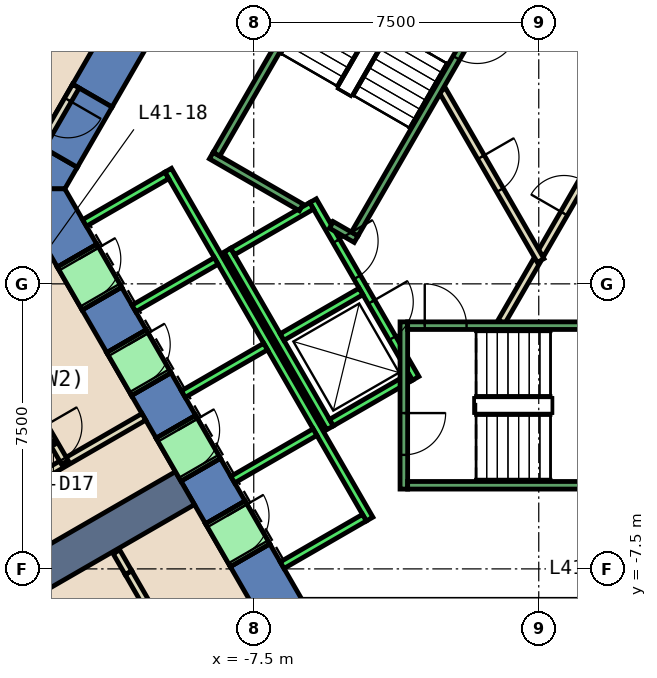
"""IFC4 building model, lengths in metres.
Left out: names, types, materials, properties, quantities, classifications, styles, units other than length and angle.
Written with IfcOpenShell. Run it as: python <this file> out.ifc"""

import sys

from ifc_helpers import new_model, si_unit, direction, frame, frame_2d, origin, place, context, subcontext, project, spatial, polyline, rectangle, outline, extrude, element, fill, save


model = new_model("IFC4")
c1 = context("Model", 3, precision=1e-05, world=origin(), true_north=direction((0.0, 1.0)))
c2 = subcontext(c1, "Body", "Model", "MODEL_VIEW")
j1 = project(units=[si_unit("LENGTHUNIT", "METRE"), si_unit("PLANEANGLEUNIT", "RADIAN")], contexts=[c1])
p1 = place(None, origin())
s1 = spatial("IfcSite", under=j1, at=p1, CompositionType="ELEMENT")
p2 = place(p1, origin())
s2 = spatial("IfcBuilding", under=s1, at=p2, CompositionType="ELEMENT")
p3 = place(p2, frame((0.0, 0.0, 184.4)))
s3 = spatial("IfcBuildingStorey", under=s2, at=p3, CompositionType="ELEMENT", Elevation=184.4)
p4 = place(p3, frame((0.0, 0.0, -0.6)))
e1 = element("IfcWall", 1, at=p4, inside=s3, PredefinedType="SHEAR", context=c2, shape_type="SweptSolid", body=[
    extrude(outline(polyline([(-12.267, 5.252), (-11.228, 4.652), (-6.235, 13.3), (-6.928, 14.5), (-12.267, 5.252)])), origin(), (0.0, 0.0, 1.0), 5.4),
])
p5 = place(p3, frame((0.0, 0.0, -0.6)))
e2 = element("IfcWall", 2, at=p5, inside=s3, PredefinedType="SHEAR", context=c2, shape_type="SweptSolid", body=[
    extrude(outline(polyline([(-12.143, 3.068), (-13.182, 3.667), (-13.856, 2.5), (-12.471, 2.5), (-12.143, 3.068)])), origin(), (0.0, 0.0, 1.0), 5.4),
])
p6 = place(p3, frame((0.0, 0.0, 3.6)))
e3 = element("IfcWall", 3, at=p6, inside=s3, PredefinedType="SHEAR", context=c2, shape_type="SweptSolid", body=[
    extrude(outline(polyline([(-13.182, 3.667), (-12.143, 3.068), (-11.228, 4.652), (-12.267, 5.252), (-13.182, 3.667)])), origin(), (0.0, 0.0, 1.0), 1.2),
])
p7 = place(p3, frame((0.0, 0.0, -0.6)))
e4 = element("IfcWall", 4, at=p7, inside=s3, PredefinedType="SHEAR", context=c2, shape_type="SweptSolid", body=[
    extrude(outline(polyline([(-12.667, 0.44), (-11.628, 1.04), (-12.471, 2.5), (-13.856, 2.5), (-12.667, 0.44)])), origin(), (0.0, 0.0, 1.0), 5.4),
])
p8 = place(p3, frame((0.0, 0.0, -0.6)))
e5 = element("IfcWall", 5, at=p8, inside=s3, PredefinedType="SHEAR", context=c2, shape_type="SweptSolid", body=[
    extrude(outline(polyline([(-11.367, -1.811), (-10.328, -1.211), (-10.978, -0.086), (-12.017, -0.686), (-11.367, -1.811)])), origin(), (0.0, 0.0, 1.0), 5.4),
])
p9 = place(p3, frame((0.0, 0.0, -0.6)))
e6 = element("IfcWall", 6, at=p9, inside=s3, PredefinedType="SHEAR", context=c2, shape_type="SweptSolid", body=[
    extrude(outline(polyline([(-10.067, -4.063), (-9.028, -3.463), (-9.678, -2.337), (-10.717, -2.937), (-10.067, -4.063)])), origin(), (0.0, 0.0, 1.0), 5.4),
])
p10 = place(p3, frame((0.0, 0.0, -0.6)))
e7 = element("IfcWall", 7, at=p10, inside=s3, PredefinedType="SHEAR", context=c2, shape_type="SweptSolid", body=[
    extrude(outline(polyline([(-8.767, -6.314), (-7.728, -5.714), (-8.378, -4.589), (-9.417, -5.189), (-8.767, -6.314)])), origin(), (0.0, 0.0, 1.0), 5.4),
])
p11 = place(p3, frame((0.0, 0.0, -0.6)))
e8 = element("IfcWall", 8, at=p11, inside=s3, PredefinedType="SHEAR", context=c2, shape_type="SweptSolid", body=[
    extrude(outline(polyline([(-7.078, -6.84), (-8.117, -7.44), (-6.928, -9.5), (-6.235, -8.3), (-7.078, -6.84)])), origin(), (0.0, 0.0, 1.0), 5.4),
])
p12 = place(p3, frame((0.0, 0.0, 3.6)))
e9 = element("IfcWall", 9, at=p12, inside=s3, PredefinedType="SHEAR", context=c2, shape_type="SweptSolid", body=[
    extrude(outline(polyline([(-12.017, -0.686), (-10.978, -0.086), (-11.628, 1.04), (-12.667, 0.44), (-12.017, -0.686)])), origin(), (0.0, 0.0, 1.0), 1.2),
])
p13 = place(p3, frame((0.0, 0.0, 3.6)))
e10 = element("IfcWall", 10, at=p13, inside=s3, PredefinedType="SHEAR", context=c2, shape_type="SweptSolid", body=[
    extrude(outline(polyline([(-10.717, -2.937), (-9.678, -2.337), (-10.328, -1.211), (-11.367, -1.811), (-10.717, -2.937)])), origin(), (0.0, 0.0, 1.0), 1.2),
])
p14 = place(p3, frame((0.0, 0.0, 3.6)))
e11 = element("IfcWall", 11, at=p14, inside=s3, PredefinedType="SHEAR", context=c2, shape_type="SweptSolid", body=[
    extrude(outline(polyline([(-9.417, -5.189), (-8.378, -4.589), (-9.028, -3.463), (-10.067, -4.063), (-9.417, -5.189)])), origin(), (0.0, 0.0, 1.0), 1.2),
])
p15 = place(p3, frame((0.0, 0.0, 3.6)))
e12 = element("IfcWall", 12, at=p15, inside=s3, PredefinedType="SHEAR", context=c2, shape_type="SweptSolid", body=[
    extrude(outline(polyline([(-8.117, -7.44), (-7.078, -6.84), (-7.728, -5.714), (-8.767, -6.314), (-8.117, -7.44)])), origin(), (0.0, 0.0, 1.0), 1.2),
])
p16 = place(p3, frame((-9.31, -5.375, 0.0), z_axis=(0.0, 0.0, 1.0), x_axis=(-0.866015103238, -0.500017840646, 0.0)))
e13 = element("IfcWall", 13, at=p16, inside=s3, PredefinedType="SHEAR", context=c2, shape_type="SweptSolid", body=[
    extrude(rectangle(XDim=27.139, YDim=1.0, at=frame_2d((13.57, 0.0))), origin(), (0.0, 0.0, 1.0), 4.8),
])
p17 = place(p3, frame((-0.982, -1.0, 0.0), z_axis=(0.0, 0.0, 1.0), x_axis=(0.50024047865, 0.865886518847, 0.0)))
e14 = element("IfcWall", 14, at=p17, inside=s3, PredefinedType="PARTITIONING", context=c2, shape_type="SweptSolid", body=[
    extrude(rectangle(XDim=1.863, YDim=0.2, at=frame_2d((0.931, 0.0))), origin(), (0.0, 0.0, 1.0), 4.8),
])
p18 = place(p3, frame((0.05, 0.787, 0.0), z_axis=(0.0, 0.0, 1.0), x_axis=(0.499954076797, 0.866051915934, 0.0)))
e15 = element("IfcWall", 15, at=p18, inside=s3, PredefinedType="PARTITIONING", context=c2, shape_type="SweptSolid", body=[
    extrude(rectangle(XDim=3.558, YDim=0.2, at=frame_2d((1.779, 0.0))), origin(), (0.0, 0.0, 1.0), 4.8),
])
p19 = place(p18, frame((1.229, 0.0, 0.0)))
e16 = element("IfcOpeningElement", 16, at=p19, cuts=e15, PredefinedType="OPENING", context=c2, shape_type="SweptSolid", body=[
    extrude(rectangle(XDim=1.0, YDim=2.1, at=frame_2d((0.5, 1.05))), frame((0.0, 0.11, 0.0), z_axis=(0.0, -1.0, 0.0), x_axis=(1.0, 0.0, 0.0)), (0.0, 0.0, 1.0), 0.22),
])
p20 = place(p3, frame((-2.54, 5.1, 0.0), z_axis=(0.0, 0.0, 1.0), x_axis=(0.499925051871, -0.866068670783, 0.0)))
e17 = element("IfcWall", 17, at=p20, inside=s3, PredefinedType="PARTITIONING", context=c2, shape_type="SweptSolid", body=[
    extrude(rectangle(XDim=5.181, YDim=0.2, at=frame_2d((2.59, 0.0))), origin(), (0.0, 0.0, 1.0), 4.8),
])
p21 = place(p20, frame((2.04, 0.0, 0.0)))
e18 = element("IfcOpeningElement", 18, at=p21, cuts=e17, PredefinedType="OPENING", context=c2, shape_type="SweptSolid", body=[
    extrude(rectangle(XDim=1.0, YDim=2.1, at=frame_2d((0.5, 1.05))), frame((0.0, 0.11, 0.0), z_axis=(0.0, -1.0, 0.0), x_axis=(1.0, 0.0, 0.0)), (0.0, 0.0, 1.0), 0.22),
])
p22 = place(p3, frame((-35.502, -17.996, 0.0), z_axis=(0.0, 0.0, 1.0), x_axis=(0.866041720547, 0.499971737474, 0.0)))
e19 = element("IfcWall", 19, at=p22, inside=s3, PredefinedType="PARTITIONING", context=c2, shape_type="SweptSolid", body=[
    extrude(rectangle(XDim=28.994, YDim=0.2, at=frame_2d((14.497, 0.0))), origin(), (0.0, 0.0, 1.0), 4.8),
])
p23 = place(p3, frame((-14.001, -2.05, 0.0), z_axis=(0.0, 0.0, 1.0), x_axis=(0.500026340207, -0.866010195725, 0.0)))
e20 = element("IfcWall", 20, at=p23, inside=s3, PredefinedType="PARTITIONING", context=c2, shape_type="SweptSolid", body=[
    extrude(rectangle(XDim=3.06, YDim=0.2, at=frame_2d((1.53, 0.0))), origin(), (0.0, 0.0, 1.0), 4.8),
])
p24 = place(p23, frame((1.96, 0.0, 0.0)))
e21 = element("IfcOpeningElement", 21, at=p24, cuts=e20, PredefinedType="OPENING", context=c2, shape_type="SweptSolid", body=[
    extrude(rectangle(XDim=1.0, YDim=2.1, at=frame_2d((0.5, 1.05))), frame((0.0, 0.11, 0.0), z_axis=(0.0, -1.0, 0.0), x_axis=(1.0, 0.0, 0.0)), (0.0, 0.0, 1.0), 0.22),
])
p25 = place(p3, frame((-12.181, 5.202, 0.0), z_axis=(0.0, 0.0, 1.0), x_axis=(-0.500215337403, -0.865901042976, 0.0)))
e22 = element("IfcWall", 22, at=p25, inside=s3, PredefinedType="PARTITIONING", context=c2, shape_type="SweptSolid", body=[
    extrude(rectangle(XDim=1.829, YDim=0.2, at=frame_2d((0.915, 0.0))), origin(), (0.0, 0.0, 1.0), 2.4),
])
p26 = place(p25, frame((0.415, 0.0, 0.0)))
e23 = element("IfcOpeningElement", 23, at=p26, cuts=e22, PredefinedType="OPENING", context=c2, shape_type="SweptSolid", body=[
    extrude(rectangle(XDim=1.0, YDim=2.1, at=frame_2d((0.5, 1.05))), frame((0.0, 0.11, 0.0), z_axis=(0.0, -1.0, 0.0), x_axis=(1.0, 0.0, 0.0)), (0.0, 0.0, 1.0), 0.22),
])
p27 = place(p3, frame((-10.328, -8.412, 0.0), z_axis=(0.0, 0.0, 1.0), x_axis=(-0.4998875608, 0.866090310855, 0.0)))
e24 = element("IfcWall", 24, at=p27, inside=s3, PredefinedType="PARTITIONING", context=c2, shape_type="SweptSolid", body=[
    extrude(rectangle(XDim=0.939, YDim=0.2, at=frame_2d((0.469, 0.0))), origin(), (0.0, 0.0, 1.0), 4.8),
])
p28 = place(p3, frame((-10.797, -7.599, 0.0), z_axis=(0.0, 0.0, 1.0), x_axis=(-0.499377186864, 0.866384686638, 0.0)))
e25 = element("IfcWall", 25, at=p28, inside=s3, PredefinedType="PARTITIONING", context=c2, shape_type="SweptSolid", body=[
    extrude(rectangle(XDim=0.633, YDim=0.2, at=frame_2d((0.316, 0.0))), origin(), (0.0, 0.0, 1.0), 2.4),
])
p29 = place(p3, frame((-5.94, 2.188, 0.0), z_axis=(0.0, 0.0, 1.0), x_axis=(0.500034260056, -0.866005622828, 0.0)))
e26 = element("IfcWall", 26, at=p29, inside=s3, PredefinedType="STANDARD", context=c2, shape_type="SweptSolid", body=[
    extrude(rectangle(XDim=5.399, YDim=0.2, at=frame_2d((2.7, 0.0))), origin(), (0.0, 0.0, 1.0), 4.8),
])
p30 = place(p29, frame((3.075, 0.0, 0.0)))
e27 = element("IfcOpeningElement", 27, at=p30, cuts=e26, PredefinedType="OPENING", context=c2, shape_type="SweptSolid", body=[
    extrude(rectangle(XDim=1.1, YDim=2.1, at=frame_2d((0.55, 1.05))), frame((0.0, 0.11, 0.0), z_axis=(0.0, -1.0, 0.0), x_axis=(1.0, 0.0, 0.0)), (0.0, 0.0, 1.0), 0.22),
])
p31 = place(p29, frame((1.225, 0.0, 0.0)))
e28 = element("IfcOpeningElement", 28, at=p31, cuts=e26, PredefinedType="OPENING", context=c2, shape_type="SweptSolid", body=[
    extrude(rectangle(XDim=1.1, YDim=2.1, at=frame_2d((0.55, 1.05))), frame((0.0, 0.11, 0.0), z_axis=(0.0, -1.0, 0.0), x_axis=(1.0, 0.0, 0.0)), (0.0, 0.0, 1.0), 0.22),
])
p32 = place(p3, frame((-8.192, 0.888, 0.0), z_axis=(0.0, 0.0, 1.0), x_axis=(0.500034260056, -0.866005622828, 0.0)))
e29 = element("IfcWall", 29, at=p32, inside=s3, PredefinedType="STANDARD", context=c2, shape_type="SweptSolid", body=[
    extrude(rectangle(XDim=5.399, YDim=0.2, at=frame_2d((2.7, 0.0))), origin(), (0.0, 0.0, 1.0), 4.8),
])
for number, where, z_axis, x_axis in (
    (30, (-5.977, 2.052, 0.0), (0.0, 0.0, 1.0), (-0.866, -0.5, 0.0)),
    (31, (-4.677, -0.2, 0.0), (0.0, 0.0, 1.0), (-0.866, -0.5, 0.0)),
):
    element("IfcWall", number, at=place(p3, frame(where, z_axis=z_axis, x_axis=x_axis)), inside=s3, PredefinedType="STANDARD", context=c2, shape_type="SweptSolid", body=[
        extrude(rectangle(XDim=2.399, YDim=0.2, at=frame_2d((1.2, 0.0))), origin(), (0.0, 0.0, 1.0), 4.8),
    ])
p33 = place(p3, frame((-3.377, -2.452, 0.0), z_axis=(0.0, 0.0, 1.0), x_axis=(-0.865955154139, -0.50012165622, 0.0)))
e32 = element("IfcWall", 32, at=p33, inside=s3, PredefinedType="STANDARD", context=c2, shape_type="SweptSolid", body=[
    extrude(rectangle(XDim=2.4, YDim=0.2, at=frame_2d((1.2, 0.0))), origin(), (0.0, 0.0, 1.0), 4.8),
])
p34 = place(p3, frame((-9.751, 2.99, 0.0), z_axis=(0.0, 0.0, 1.0), x_axis=(0.50000090737, -0.866024879913, 0.0)))
e33 = element("IfcWall", 33, at=p34, inside=s3, PredefinedType="STANDARD", context=c2, shape_type="SweptSolid", body=[
    extrude(rectangle(XDim=10.6, YDim=0.2, at=frame_2d((5.3, 0.0))), origin(), (0.0, 0.0, 1.0), 4.8),
])
p35 = place(p3, frame((-9.788, 2.853, 0.0), z_axis=(0.0, 0.0, 1.0), x_axis=(-0.865998541277, -0.500046524342, 0.0)))
e34 = element("IfcWall", 34, at=p35, inside=s3, PredefinedType="STANDARD", context=c2, shape_type="SweptSolid", body=[
    extrude(rectangle(XDim=2.5, YDim=0.2, at=frame_2d((1.25, 0.0))), origin(), (0.0, 0.0, 1.0), 4.8),
])
for number, where, z_axis, x_axis in (
    (35, (-8.488, 0.602, 0.0), (0.0, 0.0, 1.0), (-0.866, -0.5, 0.0)),
    (36, (-7.188, -1.65, 0.0), (0.0, 0.0, 1.0), (-0.866, -0.5, 0.0)),
    (37, (-5.888, -3.902, 0.0), (0.0, 0.0, 1.0), (-0.866, -0.5, 0.0)),
    (38, (-4.588, -6.153, 0.0), (0.0, 0.0, 1.0), (-0.866, -0.5, 0.0)),
):
    element("IfcWall", number, at=place(p3, frame(where, z_axis=z_axis, x_axis=x_axis)), inside=s3, PredefinedType="STANDARD", context=c2, shape_type="SweptSolid", body=[
        extrude(rectangle(XDim=2.5, YDim=0.2, at=frame_2d((1.25, 0.0))), origin(), (0.0, 0.0, 1.0), 4.8),
    ])
p36 = place(p3, frame((-12.148, 0.74, 0.0), z_axis=(0.0, 0.0, 1.0), x_axis=(0.500221244143, -0.865897630733, 0.0)))
e39 = element("IfcWall", 39, at=p36, inside=s3, PredefinedType="STANDARD", context=c2, shape_type="SweptSolid", body=[
    extrude(rectangle(XDim=1.299, YDim=1.2, at=frame_2d((0.65, 0.0))), origin(), (0.0, 0.0, 1.0), 2.4),
])
p37 = place(p36, frame((0.1, 0.0, 0.0)))
e40 = element("IfcOpeningElement", 40, at=p37, cuts=e39, PredefinedType="OPENING", context=c2, shape_type="SweptSolid", body=[
    extrude(rectangle(XDim=1.1, YDim=2.3, at=frame_2d((0.55, 1.15))), frame((0.0, 0.61, 0.0), z_axis=(0.0, -1.0, 0.0), x_axis=(1.0, 0.0, 0.0)), (0.0, 0.0, 1.0), 1.22),
])
p38 = place(p3, frame((-10.848, -1.511, 0.0), z_axis=(0.0, 0.0, 1.0), x_axis=(0.49989585183, -0.866085525409, 0.0)))
e41 = element("IfcWall", 41, at=p38, inside=s3, PredefinedType="STANDARD", context=c2, shape_type="SweptSolid", body=[
    extrude(rectangle(XDim=1.3, YDim=1.2, at=frame_2d((0.65, 0.0))), origin(), (0.0, 0.0, 1.0), 2.4),
])
p39 = place(p38, frame((0.1, 0.0, 0.0)))
e42 = element("IfcOpeningElement", 42, at=p39, cuts=e41, PredefinedType="OPENING", context=c2, shape_type="SweptSolid", body=[
    extrude(rectangle(XDim=1.1, YDim=2.3, at=frame_2d((0.55, 1.15))), frame((0.0, 0.61, 0.0), z_axis=(0.0, -1.0, 0.0), x_axis=(1.0, 0.0, 0.0)), (0.0, 0.0, 1.0), 1.22),
])
p40 = place(p3, frame((-9.548, -3.763, 0.0), z_axis=(0.0, 0.0, 1.0), x_axis=(0.500036693733, -0.866004217611, 0.0)))
e43 = element("IfcWall", 43, at=p40, inside=s3, PredefinedType="STANDARD", context=c2, shape_type="SweptSolid", body=[
    extrude(rectangle(XDim=1.3, YDim=1.2, at=frame_2d((0.65, 0.0))), origin(), (0.0, 0.0, 1.0), 2.4),
])
p41 = place(p40, frame((0.1, 0.0, 0.0)))
e44 = element("IfcOpeningElement", 44, at=p41, cuts=e43, PredefinedType="OPENING", context=c2, shape_type="SweptSolid", body=[
    extrude(rectangle(XDim=1.1, YDim=2.3, at=frame_2d((0.55, 1.15))), frame((0.0, 0.61, 0.0), z_axis=(0.0, -1.0, 0.0), x_axis=(1.0, 0.0, 0.0)), (0.0, 0.0, 1.0), 1.22),
])
p42 = place(p3, frame((-8.248, -6.015, 0.0), z_axis=(0.0, 0.0, 1.0), x_axis=(0.500362116554, -0.865816234728, 0.0)))
e45 = element("IfcWall", 45, at=p42, inside=s3, PredefinedType="STANDARD", context=c2, shape_type="SweptSolid", body=[
    extrude(rectangle(XDim=1.299, YDim=1.2, at=frame_2d((0.65, 0.0))), origin(), (0.0, 0.0, 1.0), 2.4),
])
p43 = place(p42, frame((0.1, 0.0, 0.0)))
e46 = element("IfcOpeningElement", 46, at=p43, cuts=e45, PredefinedType="OPENING", context=c2, shape_type="SweptSolid", body=[
    extrude(rectangle(XDim=1.1, YDim=2.3, at=frame_2d((0.55, 1.15))), frame((0.0, 0.61, 0.0), z_axis=(0.0, -1.0, 0.0), x_axis=(1.0, 0.0, 0.0)), (0.0, 0.0, 1.0), 1.22),
])
p44 = place(p3, frame((-3.55, -1.0, 0.0), z_axis=(0.0, 0.0, 1.0), x_axis=(0.0, -1.0, 0.0)))
e47 = element("IfcWall", 47, at=p44, inside=s3, PredefinedType="STANDARD", context=c2, shape_type="SweptSolid", body=[
    extrude(rectangle(XDim=4.4, YDim=0.2, at=frame_2d((2.2, 0.0))), origin(), (0.0, 0.0, 1.0), 4.8),
])
p45 = place(p44, frame((2.4, 0.0, 0.0)))
e48 = element("IfcOpeningElement", 48, at=p45, cuts=e47, PredefinedType="OPENING", context=c2, shape_type="SweptSolid", body=[
    extrude(rectangle(XDim=1.1, YDim=2.2, at=frame_2d((0.55, 1.1))), frame((0.0, 0.11, 0.0), z_axis=(0.0, -1.0, 0.0), x_axis=(1.0, 0.0, 0.0)), (0.0, 0.0, 1.0), 0.22),
])
p46 = place(p3, frame((-3.45, -1.1, 0.0), z_axis=(0.0, 0.0, 1.0), x_axis=(1.0, 0.0, 0.0)))
e49 = element("IfcWall", 49, at=p46, inside=s3, PredefinedType="STANDARD", context=c2, shape_type="SweptSolid", body=[
    extrude(rectangle(XDim=6.9, YDim=0.2, at=frame_2d((3.45, 0.0))), origin(), (0.0, 0.0, 1.0), 4.8),
])
p47 = place(p46, frame((0.45, 0.0, 0.0)))
e50 = element("IfcOpeningElement", 50, at=p47, cuts=e49, PredefinedType="OPENING", context=c2, shape_type="SweptSolid", body=[
    extrude(rectangle(XDim=1.1, YDim=2.2, at=frame_2d((0.55, 1.1))), frame((0.0, 0.11, 0.0), z_axis=(0.0, -1.0, 0.0), x_axis=(1.0, 0.0, 0.0)), (0.0, 0.0, 1.0), 0.22),
])
p48 = place(p3, frame((-3.45, -5.3, 0.0), z_axis=(0.0, 0.0, 1.0), x_axis=(1.0, 0.0, 0.0)))
e51 = element("IfcWall", 51, at=p48, inside=s3, PredefinedType="STANDARD", context=c2, shape_type="SweptSolid", body=[
    extrude(rectangle(XDim=6.9, YDim=0.2, at=frame_2d((3.45, 0.0))), origin(), (0.0, 0.0, 1.0), 4.8),
])
p49 = place(p3, frame((-6.25, 2.01, 0.0), z_axis=(0.0, 0.0, 1.0), x_axis=(-0.86611865017, 0.499838457731, 0.0)))
e52 = element("IfcWall", 52, at=p49, inside=s3, PredefinedType="STANDARD", context=c2, shape_type="SweptSolid", body=[
    extrude(rectangle(XDim=2.733, YDim=0.2, at=frame_2d((1.366, 0.0))), origin(), (0.0, 0.0, 1.0), 4.8),
])
p50 = place(p3, frame((-4.806, 1.176, 0.0), z_axis=(0.0, 0.0, 1.0), x_axis=(-0.866558586415, 0.499075361355, 0.0)))
e53 = element("IfcWall", 53, at=p50, inside=s3, PredefinedType="STANDARD", context=c2, shape_type="SweptSolid", body=[
    extrude(rectangle(XDim=0.751, YDim=0.2, at=frame_2d((0.376, 0.0))), origin(), (0.0, 0.0, 1.0), 4.8),
])
p51 = place(p3, frame((-1.393, 7.288, 0.0), z_axis=(0.0, 0.0, 1.0), x_axis=(-0.499963383562, -0.866046543262, 0.0)))
e54 = element("IfcWall", 54, at=p51, inside=s3, PredefinedType="STANDARD", context=c2, shape_type="SweptSolid", body=[
    extrude(rectangle(XDim=6.9, YDim=0.2, at=frame_2d((3.45, 0.0))), origin(), (0.0, 0.0, 1.0), 4.8),
])
p52 = place(p51, frame((0.45, 0.0, 0.0)))
e55 = element("IfcOpeningElement", 55, at=p52, cuts=e54, PredefinedType="OPENING", context=c2, shape_type="SweptSolid", body=[
    extrude(rectangle(XDim=1.1, YDim=2.2, at=frame_2d((0.55, 1.1))), frame((0.0, 0.11, 0.0), z_axis=(0.0, -1.0, 0.0), x_axis=(1.0, 0.0, 0.0)), (0.0, 0.0, 1.0), 0.22),
])
p53 = place(p3, frame((-5.03, 9.388, 0.0), z_axis=(0.0, 0.0, 1.0), x_axis=(-0.499978703459, -0.866037698999, 0.0)))
e56 = element("IfcWall", 56, at=p53, inside=s3, PredefinedType="STANDARD", context=c2, shape_type="SweptSolid", body=[
    extrude(rectangle(XDim=6.9, YDim=0.2, at=frame_2d((3.45, 0.0))), origin(), (0.0, 0.0, 1.0), 4.8),
])
p54 = place(p24, origin())
e57 = element("IfcDoor", 57, at=p54, inside=s3, OperationType="SINGLE_SWING_LEFT", PredefinedType="DOOR", context=c2, shape_type="SweptSolid", body=[
    extrude(rectangle(XDim=1.0, YDim=2.1, at=frame_2d((0.5, 1.05))), frame((0.0, 0.025, 0.0), z_axis=(0.0, -1.0, 0.0), x_axis=(1.0, 0.0, 0.0)), (0.0, 0.0, 1.0), 0.05),
])
fill(e21, e57)
p55 = place(p19, origin())
e58 = element("IfcDoor", 58, at=p55, inside=s3, OperationType="SINGLE_SWING_RIGHT", PredefinedType="DOOR", context=c2, shape_type="SweptSolid", body=[
    extrude(rectangle(XDim=1.0, YDim=2.1, at=frame_2d((0.5, 1.05))), frame((0.0, 0.025, 0.0), z_axis=(0.0, -1.0, 0.0), x_axis=(1.0, 0.0, 0.0)), (0.0, 0.0, 1.0), 0.05),
])
fill(e16, e58)
p56 = place(p21, origin())
e59 = element("IfcDoor", 59, at=p56, inside=s3, OperationType="SINGLE_SWING_RIGHT", PredefinedType="DOOR", context=c2, shape_type="SweptSolid", body=[
    extrude(rectangle(XDim=1.0, YDim=2.1, at=frame_2d((0.5, 1.05))), frame((0.0, 0.025, 0.0), z_axis=(0.0, -1.0, 0.0), x_axis=(1.0, 0.0, 0.0)), (0.0, 0.0, 1.0), 0.05),
])
fill(e18, e59)
p57 = place(p26, origin())
e60 = element("IfcDoor", 60, at=p57, inside=s3, OperationType="SINGLE_SWING_LEFT", PredefinedType="DOOR", context=c2, shape_type="SweptSolid", body=[
    extrude(rectangle(XDim=1.0, YDim=2.1, at=frame_2d((0.5, 1.05))), frame((0.0, 0.025, 0.0), z_axis=(0.0, -1.0, 0.0), x_axis=(1.0, 0.0, 0.0)), (0.0, 0.0, 1.0), 0.05),
])
fill(e23, e60)
p58 = place(p37, origin())
e61 = element("IfcDoor", 61, at=p58, inside=s3, OperationType="SLIDING_TO_LEFT", PredefinedType="DOOR", context=c2, shape_type="SweptSolid", body=[
    extrude(rectangle(XDim=1.1, YDim=2.3, at=frame_2d((0.55, 1.15))), frame((0.0, 0.025, 0.0), z_axis=(0.0, -1.0, 0.0), x_axis=(1.0, 0.0, 0.0)), (0.0, 0.0, 1.0), 0.05),
])
fill(e40, e61)
p59 = place(p39, origin())
e62 = element("IfcDoor", 62, at=p59, inside=s3, OperationType="SLIDING_TO_LEFT", PredefinedType="DOOR", context=c2, shape_type="SweptSolid", body=[
    extrude(rectangle(XDim=1.1, YDim=2.3, at=frame_2d((0.55, 1.15))), frame((0.0, 0.025, 0.0), z_axis=(0.0, -1.0, 0.0), x_axis=(1.0, 0.0, 0.0)), (0.0, 0.0, 1.0), 0.05),
])
fill(e42, e62)
p60 = place(p41, origin())
e63 = element("IfcDoor", 63, at=p60, inside=s3, OperationType="SLIDING_TO_LEFT", PredefinedType="DOOR", context=c2, shape_type="SweptSolid", body=[
    extrude(rectangle(XDim=1.1, YDim=2.3, at=frame_2d((0.55, 1.15))), frame((0.0, 0.025, 0.0), z_axis=(0.0, -1.0, 0.0), x_axis=(1.0, 0.0, 0.0)), (0.0, 0.0, 1.0), 0.05),
])
fill(e44, e63)
p61 = place(p43, origin())
e64 = element("IfcDoor", 64, at=p61, inside=s3, OperationType="SLIDING_TO_LEFT", PredefinedType="DOOR", context=c2, shape_type="SweptSolid", body=[
    extrude(rectangle(XDim=1.1, YDim=2.3, at=frame_2d((0.55, 1.15))), frame((0.0, 0.025, 0.0), z_axis=(0.0, -1.0, 0.0), x_axis=(1.0, 0.0, 0.0)), (0.0, 0.0, 1.0), 0.05),
])
fill(e46, e64)
p62 = place(p30, origin())
e65 = element("IfcDoor", 65, at=p62, inside=s3, OperationType="SLIDING_TO_LEFT", PredefinedType="DOOR", context=c2, shape_type="SweptSolid", body=[
    extrude(rectangle(XDim=1.1, YDim=2.1, at=frame_2d((0.55, 1.05))), frame((0.0, 0.025, 0.0), z_axis=(0.0, -1.0, 0.0), x_axis=(1.0, 0.0, 0.0)), (0.0, 0.0, 1.0), 0.05),
])
fill(e27, e65)
p63 = place(p31, origin())
e66 = element("IfcDoor", 66, at=p63, inside=s3, OperationType="SLIDING_TO_LEFT", PredefinedType="DOOR", context=c2, shape_type="SweptSolid", body=[
    extrude(rectangle(XDim=1.1, YDim=2.1, at=frame_2d((0.55, 1.05))), frame((0.0, 0.025, 0.0), z_axis=(0.0, -1.0, 0.0), x_axis=(1.0, 0.0, 0.0)), (0.0, 0.0, 1.0), 0.05),
])
fill(e28, e66)
p64 = place(p47, origin())
e67 = element("IfcDoor", 67, at=p64, inside=s3, OperationType="SINGLE_SWING_LEFT", PredefinedType="DOOR", context=c2, shape_type="SweptSolid", body=[
    extrude(rectangle(XDim=1.1, YDim=2.2, at=frame_2d((0.55, 1.1))), frame((0.0, 0.025, 0.0), z_axis=(0.0, -1.0, 0.0), x_axis=(1.0, 0.0, 0.0)), (0.0, 0.0, 1.0), 0.05),
])
fill(e50, e67)
p65 = place(p45, origin())
e68 = element("IfcDoor", 68, at=p65, inside=s3, OperationType="SINGLE_SWING_LEFT", PredefinedType="DOOR", context=c2, shape_type="SweptSolid", body=[
    extrude(rectangle(XDim=1.1, YDim=2.2, at=frame_2d((0.55, 1.1))), frame((0.0, 0.025, 0.0), z_axis=(0.0, -1.0, 0.0), x_axis=(1.0, 0.0, 0.0)), (0.0, 0.0, 1.0), 0.05),
])
fill(e48, e68)
p66 = place(p52, origin())
e69 = element("IfcDoor", 69, at=p66, inside=s3, OperationType="SINGLE_SWING_LEFT", PredefinedType="DOOR", context=c2, shape_type="SweptSolid", body=[
    extrude(rectangle(XDim=1.1, YDim=2.2, at=frame_2d((0.55, 1.1))), frame((0.0, 0.025, 0.0), z_axis=(0.0, -1.0, 0.0), x_axis=(1.0, 0.0, 0.0)), (0.0, 0.0, 1.0), 0.05),
])
fill(e55, e69)
save(model, sys.argv[1])
